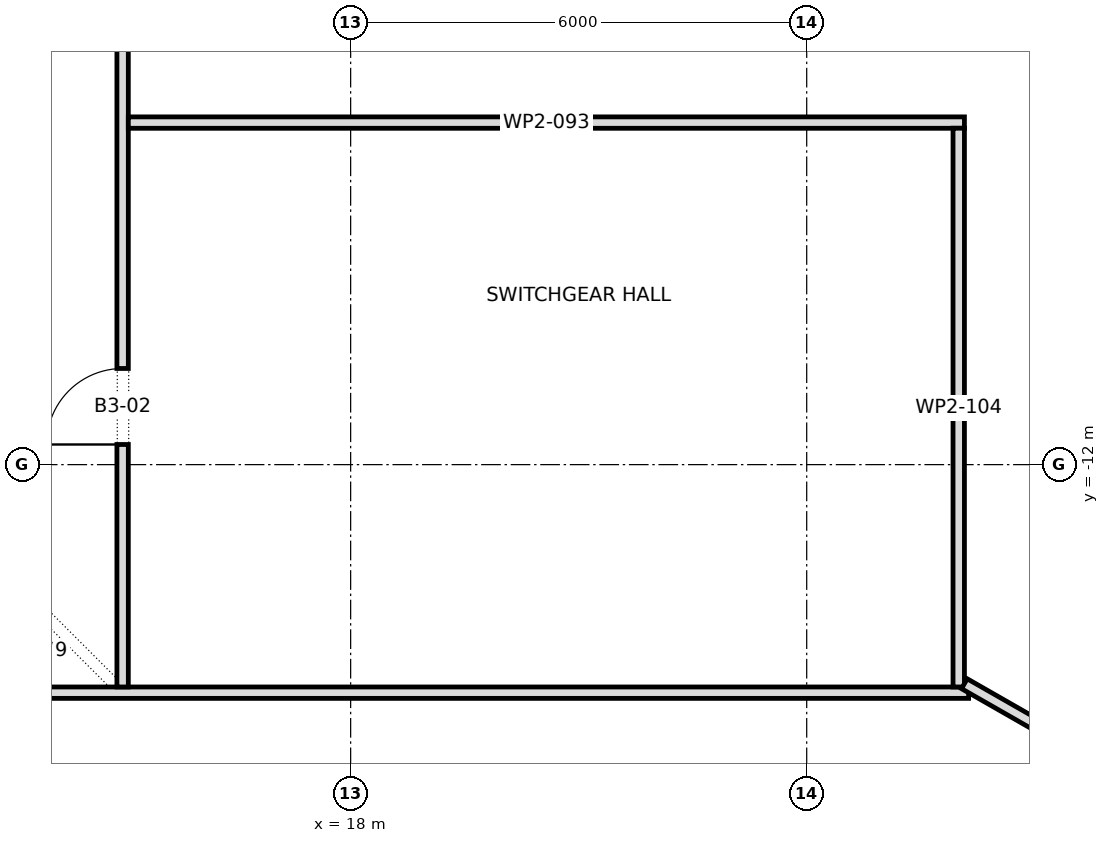
"""IFC4 building model, lengths in metres.
Left out: names, types, materials, properties, quantities, classifications, styles, units other than length and angle.
Written with IfcOpenShell. Run it as: python <this file> out.ifc"""

import sys

from ifc_helpers import new_model, si_unit, direction, frame, frame_2d, origin, place, context, subcontext, project, spatial, polyline, rectangle, outline, extrude, element, fill, save


model = new_model("IFC4")
c1 = context("Model", 3, precision=1e-05, world=origin(), true_north=direction((0.0, 1.0)))
c2 = subcontext(c1, "Body", "Model", "MODEL_VIEW")
j1 = project(units=[si_unit("LENGTHUNIT", "METRE"), si_unit("PLANEANGLEUNIT", "RADIAN")], contexts=[c1])
p1 = place(None, origin())
s1 = spatial("IfcSite", under=j1, at=p1, CompositionType="ELEMENT")
p2 = place(p1, origin())
s2 = spatial("IfcBuilding", under=s1, at=p2, CompositionType="ELEMENT")
p3 = place(p2, frame((0.0, 0.0, -15.0)))
s3 = spatial("IfcBuildingStorey", under=s2, at=p3, CompositionType="ELEMENT", Elevation=-15.0)
p4 = place(p3, frame((1.275, -15.0, 0.0), z_axis=(0.0, 0.0, 1.0), x_axis=(1.0, 0.0, 0.0)))
e1 = element("IfcWall", 1, at=p4, inside=s3, PredefinedType="PARTITIONING", context=c2, shape_type="SweptSolid", body=[
    extrude(rectangle(XDim=24.855, YDim=0.15, at=frame_2d((12.427, 0.0))), origin(), (0.0, 0.0, 1.0), 5.15),
])
p5 = place(p4, frame((4.294, 0.0, 0.0)))
e2 = element("IfcOpeningElement", 2, at=p5, cuts=e1, PredefinedType="OPENING", context=c2, shape_type="SweptSolid", body=[
    extrude(rectangle(XDim=1.8, YDim=2.1, at=frame_2d((0.9, 1.05))), frame((0.0, 0.087, 0.0), z_axis=(0.0, -1.0, 0.0), x_axis=(1.0, 0.0, 0.0)), (0.0, 0.0, 1.0), 0.174),
])
p6 = place(p4, frame((11.575, 0.0, 0.0)))
e3 = element("IfcOpeningElement", 3, at=p6, cuts=e1, PredefinedType="OPENING", context=c2, shape_type="SweptSolid", body=[
    extrude(rectangle(XDim=1.0, YDim=2.1, at=frame_2d((0.5, 1.05))), frame((0.0, 0.087, 0.0), z_axis=(0.0, -1.0, 0.0), x_axis=(1.0, 0.0, 0.0)), (0.0, 0.0, 1.0), 0.174),
])
p7 = place(p3, frame((11.788, -15.074, 0.0), z_axis=(0.0, 0.0, 1.0), x_axis=(0.615848120598, -0.787864894735, 0.0)))
e4 = element("IfcWall", 4, at=p7, inside=s3, PredefinedType="PARTITIONING", context=c2, shape_type="SweptSolid", body=[
    extrude(outline(polyline([(0.0, -0.075), (14.428, -0.075), (14.449, 0.075), (0.0, 0.075), (0.0, -0.075)])), origin(), (0.0, 0.0, 1.0), 5.15),
])
p8 = place(p3, frame((15.0, -14.925, 0.0), z_axis=(0.0, 0.0, 1.0), x_axis=(0.0, 1.0, 0.0)))
e5 = element("IfcWall", 5, at=p8, inside=s3, PredefinedType="PARTITIONING", context=c2, shape_type="SweptSolid", body=[
    extrude(rectangle(XDim=29.85, YDim=0.15, at=frame_2d((14.925, 0.0))), origin(), (0.0, 0.0, 1.0), 5.15),
])
p9 = place(p8, frame((25.66, 0.0, 0.0)))
e6 = element("IfcOpeningElement", 6, at=p9, cuts=e5, PredefinedType="OPENING", context=c2, shape_type="SweptSolid", body=[
    extrude(rectangle(XDim=1.0, YDim=2.1, at=frame_2d((0.5, 1.05))), frame((0.0, 0.087, 0.0), z_axis=(0.0, -1.0, 0.0), x_axis=(1.0, 0.0, 0.0)), (0.0, 0.0, 1.0), 0.174),
])
p10 = place(p8, frame((3.19, 0.0, 0.0)))
e7 = element("IfcOpeningElement", 7, at=p10, cuts=e5, PredefinedType="OPENING", context=c2, shape_type="SweptSolid", body=[
    extrude(rectangle(XDim=1.0, YDim=2.1, at=frame_2d((0.5, 1.05))), frame((0.0, 0.087, 0.0), z_axis=(0.0, -1.0, 0.0), x_axis=(1.0, 0.0, 0.0)), (0.0, 0.0, 1.0), 0.174),
])
p11 = place(p8, frame((13.725, 0.0, 0.0)))
e8 = element("IfcOpeningElement", 8, at=p11, cuts=e5, PredefinedType="OPENING", context=c2, shape_type="SweptSolid", body=[
    extrude(rectangle(XDim=2.4, YDim=2.1, at=frame_2d((1.2, 1.05))), frame((0.0, 0.087, 0.0), z_axis=(0.0, -1.0, 0.0), x_axis=(1.0, 0.0, 0.0)), (0.0, 0.0, 1.0), 0.174),
])
p12 = place(p3, frame((15.075, -7.5, 0.0), z_axis=(0.0, 0.0, 1.0), x_axis=(1.0, 0.0, 0.0)))
e9 = element("IfcWall", 9, at=p12, inside=s3, PredefinedType="PARTITIONING", context=c2, shape_type="SweptSolid", body=[
    extrude(rectangle(XDim=11.0, YDim=0.15, at=frame_2d((5.5, 0.0))), origin(), (0.0, 0.0, 1.0), 5.15),
])
p13 = place(p3, frame((26.0, -14.925, 0.0), z_axis=(0.0, 0.0, 1.0), x_axis=(0.0, 1.0, 0.0)))
e10 = element("IfcWall", 10, at=p13, inside=s3, PredefinedType="PARTITIONING", context=c2, shape_type="SweptSolid", body=[
    extrude(rectangle(XDim=7.351, YDim=0.15, at=frame_2d((3.676, 0.0))), origin(), (0.0, 0.0, 1.0), 5.15),
])
p14 = place(p3, frame((26.074, -14.882, 0.0), z_axis=(0.0, 0.0, 1.0), x_axis=(0.868133416031, -0.496330909746, 0.0)))
e11 = element("IfcWall", 11, at=p14, inside=s3, PredefinedType="PARTITIONING", context=c2, shape_type="SweptSolid", body=[
    extrude(outline(polyline([(0.0, -0.075), (5.604, -0.075), (5.626, 0.075), (0.0, 0.075), (0.0, -0.075)])), origin(), (0.0, 0.0, 1.0), 5.15),
])
p15 = place(p10, origin())
e12 = element("IfcDoor", 12, at=p15, inside=s3, OperationType="SINGLE_SWING_RIGHT", PredefinedType="DOOR", context=c2, shape_type="SweptSolid", body=[
    extrude(rectangle(XDim=1.0, YDim=2.1, at=frame_2d((0.5, 1.05))), frame((0.0, 0.025, 0.0), z_axis=(0.0, -1.0, 0.0), x_axis=(1.0, 0.0, 0.0)), (0.0, 0.0, 1.0), 0.05),
])
fill(e7, e12)
save(model, sys.argv[1])
